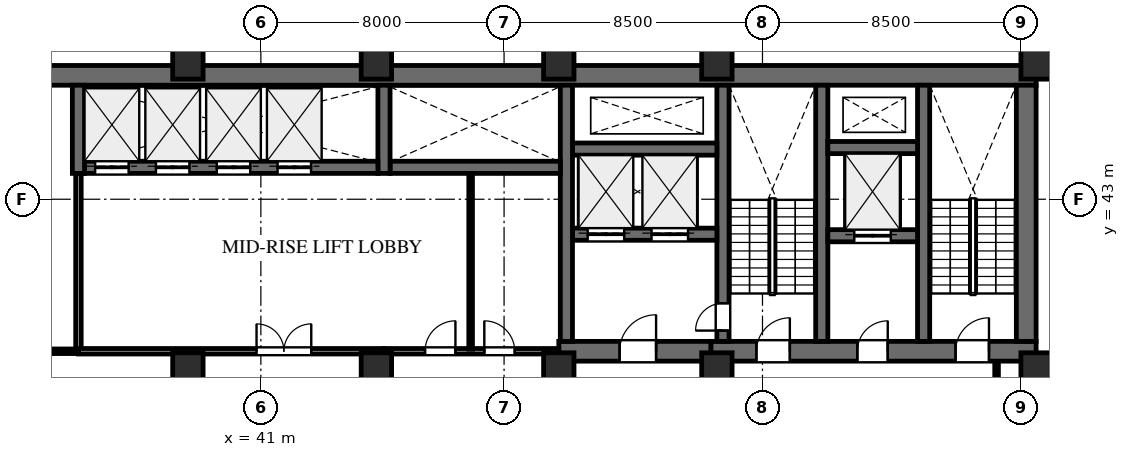
"""IFC4 building model, lengths in metres.
Left out: names, types, materials, properties, quantities, classifications, styles, units other than length and angle.
Written with IfcOpenShell. Run it as: python <this file> out.ifc"""

import sys

from ifc_helpers import new_model, si_unit, direction, frame, frame_2d, origin, origin_2d, place, context, subcontext, project, spatial, rectangle, extrude, element, fill, save


model = new_model("IFC4")
c1 = context("Model", 3, precision=1e-05, world=origin(), true_north=direction((0.0, 1.0)))
c2 = subcontext(c1, "Body", "Model", "MODEL_VIEW")
j1 = project(units=[si_unit("LENGTHUNIT", "METRE"), si_unit("PLANEANGLEUNIT", "RADIAN")], contexts=[c1])
p1 = place(None, origin())
s1 = spatial("IfcSite", under=j1, at=p1, CompositionType="ELEMENT")
p2 = place(p1, origin())
s2 = spatial("IfcBuilding", under=s1, at=p2, CompositionType="ELEMENT")
p3 = place(p2, frame((0.0, 0.0, 112.0)))
s3 = spatial("IfcBuildingStorey", under=s2, at=p3, CompositionType="ELEMENT", Elevation=112.0)
p4 = place(p3, frame((22.9, 47.075, 0.0), z_axis=(0.0, 0.0, 1.0), x_axis=(1.0, 0.0, 0.0)))
e1 = element("IfcWall", 1, at=p4, inside=s3, PredefinedType="SHEAR", context=c2, shape_type="SweptSolid", body=[
    extrude(rectangle(XDim=43.6, YDim=0.65, at=frame_2d((21.8, 0.0))), origin(), (0.0, 0.0, 1.0), 4.0),
])
p5 = place(p3, frame((55.8, 38.0, 0.0), z_axis=(0.0, 0.0, 1.0), x_axis=(1.0, 0.0, 0.0)))
e2 = element("IfcWall", 2, at=p5, inside=s3, PredefinedType="SHEAR", context=c2, shape_type="SweptSolid", body=[
    extrude(rectangle(XDim=10.7, YDim=0.65, at=frame_2d((5.35, 0.0))), origin(), (0.0, 0.0, 1.0), 4.0),
])
p6 = place(p5, frame((1.5, 0.0, 0.0)))
e3 = element("IfcOpeningElement", 3, at=p6, cuts=e2, PredefinedType="OPENING", context=c2, shape_type="SweptSolid", body=[
    extrude(rectangle(XDim=1.1, YDim=2.2, at=frame_2d((0.55, 1.1))), frame((0.0, 0.335, 0.0), z_axis=(0.0, -1.0, 0.0), x_axis=(1.0, 0.0, 0.0)), (0.0, 0.0, 1.0), 0.67),
])
p7 = place(p5, frame((4.82, 0.0, 0.0)))
e4 = element("IfcOpeningElement", 4, at=p7, cuts=e2, PredefinedType="OPENING", context=c2, shape_type="SweptSolid", body=[
    extrude(rectangle(XDim=1.0, YDim=2.15, at=frame_2d((0.5, 1.075))), frame((0.0, 0.335, 0.0), z_axis=(0.0, -1.0, 0.0), x_axis=(1.0, 0.0, 0.0)), (0.0, 0.0, 1.0), 0.67),
])
p8 = place(p5, frame((8.05, 0.0, 0.0)))
e5 = element("IfcOpeningElement", 5, at=p8, cuts=e2, PredefinedType="OPENING", context=c2, shape_type="SweptSolid", body=[
    extrude(rectangle(XDim=1.1, YDim=2.2, at=frame_2d((0.55, 1.1))), frame((0.0, 0.335, 0.0), z_axis=(0.0, -1.0, 0.0), x_axis=(1.0, 0.0, 0.0)), (0.0, 0.0, 1.0), 0.67),
])
p9 = place(p3, frame((66.175, 38.325, 0.0), z_axis=(0.0, 0.0, 1.0), x_axis=(0.0, 1.0, 0.0)))
e6 = element("IfcWall", 6, at=p9, inside=s3, PredefinedType="SHEAR", context=c2, shape_type="SweptSolid", body=[
    extrude(rectangle(XDim=8.425, YDim=0.65, at=frame_2d((4.212, 0.0))), origin(), (0.0, 0.0, 1.0), 4.0),
])
for number, where, z_axis, x_axis in (
    (7, (62.8, 38.325, 0.0), (0.0, 0.0, 1.0), (0.0, 1.0, 0.0)),
    (8, (59.45, 38.325, 0.0), (0.0, 0.0, 1.0), (0.0, 1.0, 0.0)),
):
    element("IfcWall", number, at=place(p3, frame(where, z_axis=z_axis, x_axis=x_axis)), inside=s3, PredefinedType="SHEAR", context=c2, shape_type="SweptSolid", body=[
        extrude(rectangle(XDim=8.425, YDim=0.4, at=frame_2d((4.212, 0.0))), origin(), (0.0, 0.0, 1.0), 4.0),
    ])
p10 = place(p3, frame((56.2, 38.325, 0.0), z_axis=(0.0, 0.0, 1.0), x_axis=(0.0, 1.0, 0.0)))
e9 = element("IfcWall", 9, at=p10, inside=s3, PredefinedType="SHEAR", context=c2, shape_type="SweptSolid", body=[
    extrude(rectangle(XDim=8.425, YDim=0.4, at=frame_2d((4.212, 0.0))), origin(), (0.0, 0.0, 1.0), 4.0),
])
p11 = place(p10, frame((0.355, 0.0, 0.0)))
e10 = element("IfcOpeningElement", 10, at=p11, cuts=e9, PredefinedType="OPENING", context=c2, shape_type="SweptSolid", body=[
    extrude(rectangle(XDim=0.9, YDim=2.15, at=frame_2d((0.45, 1.075))), frame((0.0, 0.21, 0.0), z_axis=(0.0, -1.0, 0.0), x_axis=(1.0, 0.0, 0.0)), (0.0, 0.0, 1.0), 0.42),
])
p12 = place(p3, frame((59.65, 41.8, 0.0), z_axis=(0.0, 0.0, 1.0), x_axis=(1.0, 0.0, 0.0)))
e11 = element("IfcWall", 11, at=p12, inside=s3, PredefinedType="SHEAR", context=c2, shape_type="SweptSolid", body=[
    extrude(rectangle(XDim=2.95, YDim=0.4, at=frame_2d((1.475, 0.0))), origin(), (0.0, 0.0, 1.0), 4.0),
])
p13 = place(p12, frame((0.87, 0.0, 0.0)))
e12 = element("IfcOpeningElement", 12, at=p13, cuts=e11, PredefinedType="OPENING", context=c2, shape_type="SweptSolid", body=[
    extrude(rectangle(XDim=1.2, YDim=2.2, at=frame_2d((0.6, 1.1))), frame((0.0, 0.21, 0.0), z_axis=(0.0, -1.0, 0.0), x_axis=(1.0, 0.0, 0.0)), (0.0, 0.0, 1.0), 0.42),
])
p14 = place(p3, frame((59.65, 44.7, 0.0), z_axis=(0.0, 0.0, 1.0), x_axis=(1.0, 0.0, 0.0)))
e13 = element("IfcWall", 13, at=p14, inside=s3, PredefinedType="SHEAR", context=c2, shape_type="SweptSolid", body=[
    extrude(rectangle(XDim=2.95, YDim=0.4, at=frame_2d((1.475, 0.0))), origin(), (0.0, 0.0, 1.0), 4.0),
])
p15 = place(p3, frame((50.8, 38.0, 0.0), z_axis=(0.0, 0.0, 1.0), x_axis=(1.0, 0.0, 0.0)))
e14 = element("IfcWall", 14, at=p15, inside=s3, PredefinedType="SHEAR", context=c2, shape_type="SweptSolid", body=[
    extrude(rectangle(XDim=5.0, YDim=0.65, at=frame_2d((2.5, 0.0))), origin(), (0.0, 0.0, 1.0), 4.0),
])
p16 = place(p15, frame((2.0, 0.0, 0.0)))
e15 = element("IfcOpeningElement", 15, at=p16, cuts=e14, PredefinedType="OPENING", context=c2, shape_type="SweptSolid", body=[
    extrude(rectangle(XDim=1.2, YDim=2.2, at=frame_2d((0.6, 1.1))), frame((0.0, 0.335, 0.0), z_axis=(0.0, -1.0, 0.0), x_axis=(1.0, 0.0, 0.0)), (0.0, 0.0, 1.0), 0.67),
])
p17 = place(p3, frame((51.25, 41.85, 0.0), z_axis=(0.0, 0.0, 1.0), x_axis=(1.0, 0.0, 0.0)))
e16 = element("IfcWall", 16, at=p17, inside=s3, PredefinedType="SHEAR", context=c2, shape_type="SweptSolid", body=[
    extrude(rectangle(XDim=4.75, YDim=0.4, at=frame_2d((2.375, 0.0))), origin(), (0.0, 0.0, 1.0), 4.0),
])
p18 = place(p17, frame((0.5, 0.0, 0.0)))
e17 = element("IfcOpeningElement", 17, at=p18, cuts=e16, PredefinedType="OPENING", context=c2, shape_type="SweptSolid", body=[
    extrude(rectangle(XDim=1.2, YDim=2.2, at=frame_2d((0.6, 1.1))), frame((0.0, 0.21, 0.0), z_axis=(0.0, -1.0, 0.0), x_axis=(1.0, 0.0, 0.0)), (0.0, 0.0, 1.0), 0.42),
])
p19 = place(p17, frame((2.6, 0.0, 0.0)))
e18 = element("IfcOpeningElement", 18, at=p19, cuts=e16, PredefinedType="OPENING", context=c2, shape_type="SweptSolid", body=[
    extrude(rectangle(XDim=1.2, YDim=2.2, at=frame_2d((0.6, 1.1))), frame((0.0, 0.21, 0.0), z_axis=(0.0, -1.0, 0.0), x_axis=(1.0, 0.0, 0.0)), (0.0, 0.0, 1.0), 0.42),
])
p20 = place(p3, frame((51.25, 44.65, 0.0), z_axis=(0.0, 0.0, 1.0), x_axis=(1.0, 0.0, 0.0)))
e19 = element("IfcWall", 19, at=p20, inside=s3, PredefinedType="SHEAR", context=c2, shape_type="SweptSolid", body=[
    extrude(rectangle(XDim=4.75, YDim=0.4, at=frame_2d((2.375, 0.0))), origin(), (0.0, 0.0, 1.0), 4.0),
])
p21 = place(p3, frame((51.05, 38.325, 0.0), z_axis=(0.0, 0.0, 1.0), x_axis=(0.0, 1.0, 0.0)))
e20 = element("IfcWall", 20, at=p21, inside=s3, PredefinedType="SHEAR", context=c2, shape_type="SweptSolid", body=[
    extrude(rectangle(XDim=8.425, YDim=0.4, at=frame_2d((4.212, 0.0))), origin(), (0.0, 0.0, 1.0), 4.0),
])
p22 = place(p3, frame((45.25, 44.05, 0.0), z_axis=(0.0, 0.0, 1.0), x_axis=(1.0, 0.0, 0.0)))
e21 = element("IfcWall", 21, at=p22, inside=s3, PredefinedType="SHEAR", context=c2, shape_type="SweptSolid", body=[
    extrude(rectangle(XDim=5.6, YDim=0.4, at=frame_2d((2.8, 0.0))), origin(), (0.0, 0.0, 1.0), 4.0),
])
p23 = place(p3, frame((45.05, 43.85, 0.0), z_axis=(0.0, 0.0, 1.0), x_axis=(0.0, 1.0, 0.0)))
e22 = element("IfcWall", 22, at=p23, inside=s3, PredefinedType="SHEAR", context=c2, shape_type="SweptSolid", body=[
    extrude(rectangle(XDim=2.9, YDim=0.4, at=frame_2d((1.45, 0.0))), origin(), (0.0, 0.0, 1.0), 4.0),
])
p24 = place(p3, frame((35.2, 44.05, 0.0), z_axis=(0.0, 0.0, 1.0), x_axis=(1.0, 0.0, 0.0)))
e23 = element("IfcWall", 23, at=p24, inside=s3, PredefinedType="SHEAR", context=c2, shape_type="SweptSolid", body=[
    extrude(rectangle(XDim=9.65, YDim=0.4, at=frame_2d((4.825, 0.0))), origin(), (0.0, 0.0, 1.0), 4.0),
])
p25 = place(p24, frame((0.35, 0.0, 0.0)))
e24 = element("IfcOpeningElement", 24, at=p25, cuts=e23, PredefinedType="OPENING", context=c2, shape_type="SweptSolid", body=[
    extrude(rectangle(XDim=1.1, YDim=2.2, at=frame_2d((0.55, 1.1))), frame((0.0, 0.21, 0.0), z_axis=(0.0, -1.0, 0.0), x_axis=(1.0, 0.0, 0.0)), (0.0, 0.0, 1.0), 0.42),
])
p26 = place(p24, frame((2.35, 0.0, 0.0)))
e25 = element("IfcOpeningElement", 25, at=p26, cuts=e23, PredefinedType="OPENING", context=c2, shape_type="SweptSolid", body=[
    extrude(rectangle(XDim=1.1, YDim=2.2, at=frame_2d((0.55, 1.1))), frame((0.0, 0.21, 0.0), z_axis=(0.0, -1.0, 0.0), x_axis=(1.0, 0.0, 0.0)), (0.0, 0.0, 1.0), 0.42),
])
p27 = place(p24, frame((4.35, 0.0, 0.0)))
e26 = element("IfcOpeningElement", 26, at=p27, cuts=e23, PredefinedType="OPENING", context=c2, shape_type="SweptSolid", body=[
    extrude(rectangle(XDim=1.1, YDim=2.2, at=frame_2d((0.55, 1.1))), frame((0.0, 0.21, 0.0), z_axis=(0.0, -1.0, 0.0), x_axis=(1.0, 0.0, 0.0)), (0.0, 0.0, 1.0), 0.42),
])
p28 = place(p24, frame((6.35, 0.0, 0.0)))
e27 = element("IfcOpeningElement", 27, at=p28, cuts=e23, PredefinedType="OPENING", context=c2, shape_type="SweptSolid", body=[
    extrude(rectangle(XDim=1.1, YDim=2.2, at=frame_2d((0.55, 1.1))), frame((0.0, 0.21, 0.0), z_axis=(0.0, -1.0, 0.0), x_axis=(1.0, 0.0, 0.0)), (0.0, 0.0, 1.0), 0.42),
])
p29 = place(p3, frame((35.0, 43.85, 0.0), z_axis=(0.0, 0.0, 1.0), x_axis=(0.0, 1.0, 0.0)))
e28 = element("IfcWall", 28, at=p29, inside=s3, PredefinedType="SHEAR", context=c2, shape_type="SweptSolid", body=[
    extrude(rectangle(XDim=2.9, YDim=0.4, at=frame_2d((1.45, 0.0))), origin(), (0.0, 0.0, 1.0), 4.0),
])
for number, where, z_axis, x_axis in (
    (29, (66.5, 47.55, 0.0), (0.0, 0.0, 1.0), (1.0, 0.0, 0.0)),
    (30, (56.0, 47.55, 0.0), (0.0, 0.0, 1.0), (1.0, 0.0, 0.0)),
    (31, (66.5, 37.35, 0.0), (0.0, 0.0, 1.0), (1.0, 0.0, 0.0)),
    (32, (56.0, 37.35, 0.0), (0.0, 0.0, 1.0), (1.0, 0.0, 0.0)),
    (33, (50.8, 47.55, 0.0), (0.0, 0.0, 1.0), (1.0, 0.0, 0.0)),
    (34, (50.8, 37.35, 0.0), (0.0, 0.0, 1.0), (1.0, 0.0, 0.0)),
    (35, (44.8, 37.35, 0.0), (0.0, 0.0, 1.0), (1.0, 0.0, 0.0)),
    (36, (44.8, 47.55, 0.0), (0.0, 0.0, 1.0), (1.0, 0.0, 0.0)),
    (37, (38.6, 37.35, 0.0), (0.0, 0.0, 1.0), (1.0, 0.0, 0.0)),
    (38, (38.6, 47.55, 0.0), (0.0, 0.0, 1.0), (1.0, 0.0, 0.0)),
):
    element("IfcColumn", number, at=place(p3, frame(where, z_axis=z_axis, x_axis=x_axis)), inside=s3, PredefinedType="COLUMN", context=c2, shape_type="SweptSolid", body=[
        extrude(rectangle(XDim=1.0, YDim=1.2, at=origin_2d()), origin(), (0.0, 0.0, 1.0), 4.0),
    ])
p30 = place(p3, frame((68.375, 37.8, 0.0), z_axis=(0.0, 0.0, 1.0), x_axis=(-0.13917001236, -0.990268502811, 0.0)))
e39 = element("IfcWall", 39, at=p30, inside=s3, PredefinedType="STANDARD", context=c2, shape_type="SweptSolid", body=[
    extrude(rectangle(XDim=29.549, YDim=0.28, at=frame_2d((14.774, 0.0))), origin(), (0.0, 0.0, 1.0), 3.75),
])
p31 = place(p30, frame((8.36, 0.0, 0.0)))
e40 = element("IfcOpeningElement", 40, at=p31, cuts=e39, PredefinedType="OPENING", context=c2, shape_type="SweptSolid", body=[
    extrude(rectangle(XDim=1.0, YDim=2.15, at=frame_2d((0.5, 1.075))), frame((0.0, 0.15, 0.0), z_axis=(0.0, -1.0, 0.0), x_axis=(1.0, 0.0, 0.0)), (0.0, 0.0, 1.0), 0.3),
])
p32 = place(p30, frame((3.971, 0.0, 0.65)))
e41 = element("IfcOpeningElement", 41, at=p32, cuts=e39, PredefinedType="OPENING", context=c2, shape_type="SweptSolid", body=[
    extrude(rectangle(XDim=1.8, YDim=2.1, at=frame_2d((0.9, 1.05))), frame((0.0, 0.15, 0.0), z_axis=(0.0, -1.0, 0.0), x_axis=(1.0, 0.0, 0.0)), (0.0, 0.0, 1.0), 0.3),
])
p33 = place(p30, frame((18.256, 0.0, 0.65)))
e42 = element("IfcOpeningElement", 42, at=p33, cuts=e39, PredefinedType="OPENING", context=c2, shape_type="SweptSolid", body=[
    extrude(rectangle(XDim=1.8, YDim=2.1, at=frame_2d((0.9, 1.05))), frame((0.0, 0.15, 0.0), z_axis=(0.0, -1.0, 0.0), x_axis=(1.0, 0.0, 0.0)), (0.0, 0.0, 1.0), 0.3),
])
p34 = place(p3, frame((45.05, 38.0, 0.0), z_axis=(0.0, 0.0, 1.0), x_axis=(1.0, 0.0, 0.0)))
e43 = element("IfcWall", 43, at=p34, inside=s3, PredefinedType="STANDARD", context=c2, shape_type="SweptSolid", body=[
    extrude(rectangle(XDim=5.75, YDim=0.18, at=frame_2d((2.875, 0.0))), origin(), (0.0, 0.0, 1.0), 2.894),
])
p35 = place(p34, frame((1.35, 0.0, 0.0)))
e44 = element("IfcOpeningElement", 44, at=p35, cuts=e43, PredefinedType="OPENING", context=c2, shape_type="SweptSolid", body=[
    extrude(rectangle(XDim=1.0, YDim=2.15, at=frame_2d((0.5, 1.075))), frame((0.0, 0.1, 0.0), z_axis=(0.0, -1.0, 0.0), x_axis=(1.0, 0.0, 0.0)), (0.0, 0.0, 1.0), 0.2),
])
p36 = place(p34, frame((3.3, 0.0, 0.0)))
e45 = element("IfcOpeningElement", 45, at=p36, cuts=e43, PredefinedType="OPENING", context=c2, shape_type="SweptSolid", body=[
    extrude(rectangle(XDim=1.0, YDim=2.15, at=frame_2d((0.5, 1.075))), frame((0.0, 0.1, 0.0), z_axis=(0.0, -1.0, 0.0), x_axis=(1.0, 0.0, 0.0)), (0.0, 0.0, 1.0), 0.2),
])
p37 = place(p3, frame((47.9, 38.068, 0.0), z_axis=(0.0, 0.0, 1.0), x_axis=(0.0, 1.0, 0.0)))
e46 = element("IfcWall", 46, at=p37, inside=s3, PredefinedType="PARTITIONING", context=c2, shape_type="SweptSolid", body=[
    extrude(rectangle(XDim=5.774, YDim=0.12, at=frame_2d((2.887, 0.0))), origin(), (0.0, 0.0, 1.0), 3.75),
])
p38 = place(p3, frame((27.05, 38.0, 0.0), z_axis=(0.0, 0.0, 1.0), x_axis=(1.0, 0.0, 0.0)))
e47 = element("IfcWall", 47, at=p38, inside=s3, PredefinedType="PARTITIONING", context=c2, shape_type="SweptSolid", body=[
    extrude(rectangle(XDim=7.95, YDim=0.15, at=frame_2d((3.975, 0.0))), origin(), (0.0, 0.0, 1.0), 2.894),
])
p39 = place(p38, frame((2.25, 0.0, 0.0)))
e48 = element("IfcOpeningElement", 48, at=p39, cuts=e47, PredefinedType="OPENING", context=c2, shape_type="SweptSolid", body=[
    extrude(rectangle(XDim=1.5, YDim=2.2, at=frame_2d((0.75, 1.1))), frame((0.0, 0.085, 0.0), z_axis=(0.0, -1.0, 0.0), x_axis=(1.0, 0.0, 0.0)), (0.0, 0.0, 1.0), 0.17),
])
p40 = place(p3, frame((35.0, 38.0, 0.0), z_axis=(0.0, 0.0, 1.0), x_axis=(0.0, 1.0, 0.0)))
e49 = element("IfcWall", 49, at=p40, inside=s3, PredefinedType="STANDARD", context=c2, shape_type="SweptSolid", body=[
    extrude(rectangle(XDim=5.85, YDim=0.18, at=frame_2d((2.925, 0.0))), origin(), (0.0, 0.0, 1.0), 3.75),
])
p41 = place(p3, frame((35.0, 38.0, 0.0), z_axis=(0.0, 0.0, 1.0), x_axis=(1.0, 0.0, 0.0)))
e50 = element("IfcWall", 50, at=p41, inside=s3, PredefinedType="STANDARD", context=c2, shape_type="SweptSolid", body=[
    extrude(rectangle(XDim=10.05, YDim=0.18, at=frame_2d((5.025, 0.0))), origin(), (0.0, 0.0, 1.0), 2.894),
])
p42 = place(p41, frame((5.858, 0.0, 0.0)))
e51 = element("IfcOpeningElement", 51, at=p42, cuts=e50, PredefinedType="OPENING", context=c2, shape_type="SweptSolid", body=[
    extrude(rectangle(XDim=1.8, YDim=2.2, at=frame_2d((0.9, 1.1))), frame((0.0, 0.1, 0.0), z_axis=(0.0, -1.0, 0.0), x_axis=(1.0, 0.0, 0.0)), (0.0, 0.0, 1.0), 0.2),
])
p43 = place(p3, frame((65.2, 34.4, 0.0), z_axis=(0.0, 0.0, 1.0), x_axis=(0.0, 1.0, 0.0)))
e52 = element("IfcWall", 52, at=p43, inside=s3, PredefinedType="PARTITIONING", context=c2, shape_type="SweptSolid", body=[
    extrude(rectangle(XDim=3.267, YDim=0.12, at=frame_2d((1.634, 0.0))), origin(), (0.0, 0.0, 1.0), 2.894),
])
p44 = place(p6, origin())
e53 = element("IfcDoor", 53, at=p44, inside=s3, OperationType="SINGLE_SWING_RIGHT", PredefinedType="DOOR", context=c2, shape_type="SweptSolid", body=[
    extrude(rectangle(XDim=1.1, YDim=2.2, at=frame_2d((0.55, 1.1))), frame((0.0, 0.025, 0.0), z_axis=(0.0, -1.0, 0.0), x_axis=(1.0, 0.0, 0.0)), (0.0, 0.0, 1.0), 0.05),
])
fill(e3, e53)
p45 = place(p7, origin())
e54 = element("IfcDoor", 54, at=p45, inside=s3, OperationType="SINGLE_SWING_RIGHT", PredefinedType="DOOR", context=c2, shape_type="SweptSolid", body=[
    extrude(rectangle(XDim=1.0, YDim=2.15, at=frame_2d((0.5, 1.075))), frame((0.0, 0.025, 0.0), z_axis=(0.0, -1.0, 0.0), x_axis=(1.0, 0.0, 0.0)), (0.0, 0.0, 1.0), 0.05),
])
fill(e4, e54)
p46 = place(p8, origin())
e55 = element("IfcDoor", 55, at=p46, inside=s3, OperationType="SINGLE_SWING_RIGHT", PredefinedType="DOOR", context=c2, shape_type="SweptSolid", body=[
    extrude(rectangle(XDim=1.1, YDim=2.2, at=frame_2d((0.55, 1.1))), frame((0.0, 0.025, 0.0), z_axis=(0.0, -1.0, 0.0), x_axis=(1.0, 0.0, 0.0)), (0.0, 0.0, 1.0), 0.05),
])
fill(e5, e55)
p47 = place(p16, origin())
e56 = element("IfcDoor", 56, at=p47, inside=s3, OperationType="SINGLE_SWING_RIGHT", PredefinedType="DOOR", context=c2, shape_type="SweptSolid", body=[
    extrude(rectangle(XDim=1.2, YDim=2.2, at=frame_2d((0.6, 1.1))), frame((0.0, 0.025, 0.0), z_axis=(0.0, -1.0, 0.0), x_axis=(1.0, 0.0, 0.0)), (0.0, 0.0, 1.0), 0.05),
])
fill(e15, e56)
p48 = place(p11, origin())
e57 = element("IfcDoor", 57, at=p48, inside=s3, OperationType="SINGLE_SWING_LEFT", PredefinedType="DOOR", context=c2, shape_type="SweptSolid", body=[
    extrude(rectangle(XDim=0.9, YDim=2.15, at=frame_2d((0.45, 1.075))), frame((0.0, 0.025, 0.0), z_axis=(0.0, -1.0, 0.0), x_axis=(1.0, 0.0, 0.0)), (0.0, 0.0, 1.0), 0.05),
])
fill(e10, e57)
p49 = place(p25, origin())
e58 = element("IfcDoor", 58, at=p49, inside=s3, OperationType="DOUBLE_DOOR_SLIDING", PredefinedType="DOOR", context=c2, shape_type="SweptSolid", body=[
    extrude(rectangle(XDim=1.1, YDim=2.2, at=frame_2d((0.55, 1.1))), frame((0.0, 0.025, 0.0), z_axis=(0.0, -1.0, 0.0), x_axis=(1.0, 0.0, 0.0)), (0.0, 0.0, 1.0), 0.05),
])
fill(e24, e58)
p50 = place(p26, origin())
e59 = element("IfcDoor", 59, at=p50, inside=s3, OperationType="DOUBLE_DOOR_SLIDING", PredefinedType="DOOR", context=c2, shape_type="SweptSolid", body=[
    extrude(rectangle(XDim=1.1, YDim=2.2, at=frame_2d((0.55, 1.1))), frame((0.0, 0.025, 0.0), z_axis=(0.0, -1.0, 0.0), x_axis=(1.0, 0.0, 0.0)), (0.0, 0.0, 1.0), 0.05),
])
fill(e25, e59)
p51 = place(p27, origin())
e60 = element("IfcDoor", 60, at=p51, inside=s3, OperationType="DOUBLE_DOOR_SLIDING", PredefinedType="DOOR", context=c2, shape_type="SweptSolid", body=[
    extrude(rectangle(XDim=1.1, YDim=2.2, at=frame_2d((0.55, 1.1))), frame((0.0, 0.025, 0.0), z_axis=(0.0, -1.0, 0.0), x_axis=(1.0, 0.0, 0.0)), (0.0, 0.0, 1.0), 0.05),
])
fill(e26, e60)
p52 = place(p28, origin())
e61 = element("IfcDoor", 61, at=p52, inside=s3, OperationType="DOUBLE_DOOR_SLIDING", PredefinedType="DOOR", context=c2, shape_type="SweptSolid", body=[
    extrude(rectangle(XDim=1.1, YDim=2.2, at=frame_2d((0.55, 1.1))), frame((0.0, 0.025, 0.0), z_axis=(0.0, -1.0, 0.0), x_axis=(1.0, 0.0, 0.0)), (0.0, 0.0, 1.0), 0.05),
])
fill(e27, e61)
p53 = place(p18, origin())
e62 = element("IfcDoor", 62, at=p53, inside=s3, OperationType="DOUBLE_DOOR_SLIDING", PredefinedType="DOOR", context=c2, shape_type="SweptSolid", body=[
    extrude(rectangle(XDim=1.2, YDim=2.2, at=frame_2d((0.6, 1.1))), frame((0.0, 0.025, 0.0), z_axis=(0.0, -1.0, 0.0), x_axis=(1.0, 0.0, 0.0)), (0.0, 0.0, 1.0), 0.05),
])
fill(e17, e62)
p54 = place(p19, origin())
e63 = element("IfcDoor", 63, at=p54, inside=s3, OperationType="DOUBLE_DOOR_SLIDING", PredefinedType="DOOR", context=c2, shape_type="SweptSolid", body=[
    extrude(rectangle(XDim=1.2, YDim=2.2, at=frame_2d((0.6, 1.1))), frame((0.0, 0.025, 0.0), z_axis=(0.0, -1.0, 0.0), x_axis=(1.0, 0.0, 0.0)), (0.0, 0.0, 1.0), 0.05),
])
fill(e18, e63)
p55 = place(p13, origin())
e64 = element("IfcDoor", 64, at=p55, inside=s3, OperationType="DOUBLE_DOOR_SLIDING", PredefinedType="DOOR", context=c2, shape_type="SweptSolid", body=[
    extrude(rectangle(XDim=1.2, YDim=2.2, at=frame_2d((0.6, 1.1))), frame((0.0, 0.025, 0.0), z_axis=(0.0, -1.0, 0.0), x_axis=(1.0, 0.0, 0.0)), (0.0, 0.0, 1.0), 0.05),
])
fill(e12, e64)
p56 = place(p35, origin())
e65 = element("IfcDoor", 65, at=p56, inside=s3, OperationType="SINGLE_SWING_RIGHT", PredefinedType="DOOR", context=c2, shape_type="SweptSolid", body=[
    extrude(rectangle(XDim=1.0, YDim=2.15, at=frame_2d((0.5, 1.075))), frame((0.0, 0.025, 0.0), z_axis=(0.0, -1.0, 0.0), x_axis=(1.0, 0.0, 0.0)), (0.0, 0.0, 1.0), 0.05),
])
fill(e44, e65)
p57 = place(p36, origin())
e66 = element("IfcDoor", 66, at=p57, inside=s3, OperationType="SINGLE_SWING_LEFT", PredefinedType="DOOR", context=c2, shape_type="SweptSolid", body=[
    extrude(rectangle(XDim=1.0, YDim=2.15, at=frame_2d((0.5, 1.075))), frame((0.0, 0.025, 0.0), z_axis=(0.0, -1.0, 0.0), x_axis=(1.0, 0.0, 0.0)), (0.0, 0.0, 1.0), 0.05),
])
fill(e45, e66)
p58 = place(p42, origin())
e67 = element("IfcDoor", 67, at=p58, inside=s3, OperationType="DOUBLE_DOOR_SINGLE_SWING", PredefinedType="DOOR", context=c2, shape_type="SweptSolid", body=[
    extrude(rectangle(XDim=1.8, YDim=2.2, at=frame_2d((0.9, 1.1))), frame((0.0, 0.025, 0.0), z_axis=(0.0, -1.0, 0.0), x_axis=(1.0, 0.0, 0.0)), (0.0, 0.0, 1.0), 0.05),
])
fill(e51, e67)
save(model, sys.argv[1])
